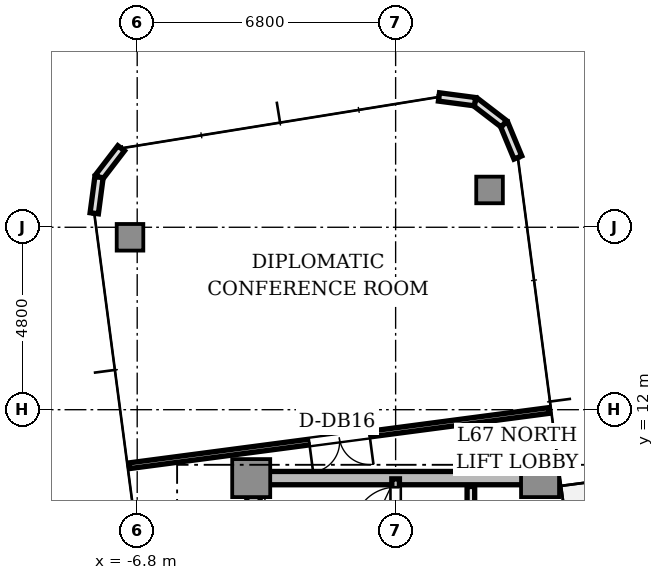
"""IFC4 building model, lengths in metres.
Left out: names, types, materials, properties, quantities, classifications, styles, units other than length and angle.
Written with IfcOpenShell. Run it as: python <this file> out.ifc"""

import sys

from ifc_helpers import new_model, si_unit, direction, frame, frame_2d, origin, origin_2d, place, context, subcontext, project, spatial, rectangle, extrude, source, transform, mapped, element, fill, save


model = new_model("IFC4")
c1 = context("Model", 3, precision=1e-05, world=origin(), true_north=direction((0.0, 1.0)))
c2 = subcontext(c1, "Body", "Model", "MODEL_VIEW")
j1 = project(units=[si_unit("LENGTHUNIT", "METRE"), si_unit("PLANEANGLEUNIT", "RADIAN")], contexts=[c1])
p1 = place(None, origin())
s1 = spatial("IfcSite", under=j1, at=p1, CompositionType="ELEMENT")
p2 = place(p1, origin())
s2 = spatial("IfcBuilding", under=s1, at=p2, CompositionType="ELEMENT")
p3 = place(p2, frame((0.0, 0.0, 241.15)))
s3 = spatial("IfcBuildingStorey", under=s2, at=p3, CompositionType="ELEMENT", Elevation=241.15)
p4 = place(p3, frame((-3.55, 10.2, 0.0), z_axis=(0.0, 0.0, 1.0), x_axis=(1.0, 0.0, 0.0)))
e1 = element("IfcWall", 1, at=p4, inside=s3, PredefinedType="SHEAR", context=c2, shape_type="SweptSolid", body=[
    extrude(rectangle(XDim=7.1, YDim=0.35, at=frame_2d((3.55, 0.0))), origin(), (0.0, 0.0, 1.0), 3.11),
])
p5 = place(p3, frame((-3.74, 2.85, 0.0), z_axis=(0.0, 0.0, 1.0), x_axis=(0.0, 1.0, 0.0)))
e2 = element("IfcWall", 2, at=p5, inside=s3, PredefinedType="SHEAR", context=c2, shape_type="SweptSolid", body=[
    extrude(rectangle(XDim=6.9, YDim=0.35, at=frame_2d((3.45, 0.0))), origin(), (0.0, 0.0, 1.0), 3.11),
])
m1 = source(origin(), c2, "Body", "SweptSolid", [
    extrude(rectangle(XDim=1.0, YDim=1.0, at=origin_2d()), origin(), (0.0, 0.0, 1.0), 3.11),
])
for number, where, z_axis, x_axis in (
    (3, (-3.8, 10.2, 0.0), (0.0, 0.0, 1.0), (1.0, 0.0, 0.0)),
    (4, (3.8, 10.2, 0.0), (0.0, 0.0, 1.0), (1.0, 0.0, 0.0)),
):
    element("IfcColumn", number, at=place(p3, frame(where, z_axis=z_axis, x_axis=x_axis)), inside=s3, PredefinedType="COLUMN", context=c2, shape_type="MappedRepresentation", body=[
        mapped(m1, transform((0.0, 0.0, 0.0), scale=1.0)),
    ])
m2 = source(origin(), c2, "Body", "SweptSolid", [
    extrude(rectangle(XDim=0.7, YDim=0.7, at=origin_2d()), origin(), (0.0, 0.0, 1.0), 3.11),
])
for number, where, z_axis, x_axis in (
    (5, (2.471, 17.782, 0.0), (0.0, 0.0, 1.0), (1.0, 0.0, 0.0)),
    (6, (-6.989, 16.536, 0.0), (0.0, 0.0, 1.0), (1.0, 0.0, 0.0)),
):
    element("IfcColumn", number, at=place(p3, frame(where, z_axis=z_axis, x_axis=x_axis)), inside=s3, PredefinedType="COLUMN", context=c2, shape_type="MappedRepresentation", body=[
        mapped(m2, transform((0.0, 0.0, 0.0), scale=1.0)),
    ])
for number, where, z_axis, x_axis in (
    (7, (3.216, 18.636, 0.0), (0.0, 0.0, 1.0), (-0.383, 0.924, 0.0)),
    (8, (2.85, 19.521, 0.0), (0.0, 0.0, 1.0), (-0.793, 0.609, 0.0)),
    (9, (2.09, 20.104, 0.0), (0.0, 0.0, 1.0), (-0.991, 0.131, 0.0)),
):
    element("IfcWall", number, at=place(p3, frame(where, z_axis=z_axis, x_axis=x_axis)), inside=s3, PredefinedType="STANDARD", context=c2, shape_type="SweptSolid", body=[
        extrude(rectangle(XDim=0.958, YDim=0.22, at=frame_2d((0.479, 0.0))), origin(), (0.0, 0.0, 1.0), 3.11),
    ])
p6 = place(p3, frame((-7.222, 18.878, 0.0), z_axis=(0.0, 0.0, 1.0), x_axis=(-0.608736668033, -0.793372339443, 0.0)))
e10 = element("IfcWall", 10, at=p6, inside=s3, PredefinedType="STANDARD", context=c2, shape_type="SweptSolid", body=[
    extrude(rectangle(XDim=0.957, YDim=0.22, at=frame_2d((0.479, 0.0))), origin(), (0.0, 0.0, 1.0), 3.11),
])
p7 = place(p3, frame((-7.805, 18.118, 0.0), z_axis=(0.0, 0.0, 1.0), x_axis=(-0.130494070426, -0.991449089759, 0.0)))
e11 = element("IfcWall", 11, at=p7, inside=s3, PredefinedType="STANDARD", context=c2, shape_type="SweptSolid", body=[
    extrude(rectangle(XDim=0.958, YDim=0.22, at=frame_2d((0.479, 0.0))), origin(), (0.0, 0.0, 1.0), 3.11),
])
p8 = place(p3, frame((0.0, 2.5, 0.0), z_axis=(0.0, 0.0, 1.0), x_axis=(0.0, 1.0, 0.0)))
e12 = element("IfcWall", 12, at=p8, inside=s3, PredefinedType="SOLIDWALL", context=c2, shape_type="SweptSolid", body=[
    extrude(rectangle(XDim=7.68, YDim=0.2, at=frame_2d((3.84, 0.0))), origin(), (0.0, 0.0, 1.0), 3.11),
])
p9 = place(p8, frame((6.36, 0.0, 0.0)))
e13 = element("IfcOpeningElement", 13, at=p9, cuts=e12, PredefinedType="OPENING", context=c2, shape_type="SweptSolid", body=[
    extrude(rectangle(XDim=1.1, YDim=2.15, at=frame_2d((0.55, 1.075))), frame((0.0, 0.11, 0.0), z_axis=(0.0, -1.0, 0.0), x_axis=(1.0, 0.0, 0.0)), (0.0, 0.0, 1.0), 0.22),
])
p10 = place(p3, frame((1.98, 5.32, 0.0), z_axis=(0.0, 0.0, 1.0), x_axis=(0.0, 1.0, 0.0)))
e14 = element("IfcWall", 14, at=p10, inside=s3, PredefinedType="SOLIDWALL", context=c2, shape_type="SweptSolid", body=[
    extrude(rectangle(XDim=4.66, YDim=0.2, at=frame_2d((2.33, 0.0))), origin(), (0.0, 0.0, 1.0), 2.66),
])
p11 = place(p10, frame((3.04, 0.0, 0.0)))
e15 = element("IfcOpeningElement", 15, at=p11, cuts=e14, PredefinedType="OPENING", context=c2, shape_type="SweptSolid", body=[
    extrude(rectangle(XDim=0.85, YDim=2.1, at=frame_2d((0.425, 1.05))), frame((0.0, 0.11, 0.0), z_axis=(0.0, -1.0, 0.0), x_axis=(1.0, 0.0, 0.0)), (0.0, 0.0, 1.0), 0.22),
])
p12 = place(p3, frame((4.042, 11.98, 0.0), z_axis=(0.0, 0.0, 1.0), x_axis=(-0.991444895998, -0.130525929223, 0.0)))
e16 = element("IfcWall", 16, at=p12, inside=s3, PredefinedType="PARTITIONING", context=c2, shape_type="SweptSolid", body=[
    extrude(rectangle(XDim=11.142, YDim=0.15, at=frame_2d((5.571, 0.0))), origin(), (0.0, 0.0, 1.0), 2.66),
])
p13 = place(p12, frame((4.771, 0.0, 0.0)))
e17 = element("IfcOpeningElement", 17, at=p13, cuts=e16, PredefinedType="OPENING", context=c2, shape_type="SweptSolid", body=[
    extrude(rectangle(XDim=1.6, YDim=2.25, at=frame_2d((0.8, 1.125))), frame((0.0, 0.085, 0.0), z_axis=(0.0, -1.0, 0.0), x_axis=(1.0, 0.0, 0.0)), (0.0, 0.0, 1.0), 0.17),
])
m3 = source(origin(), c2, "Body", "SweptSolid", [
    extrude(rectangle(XDim=1.1, YDim=0.05, at=origin_2d()), origin(), (0.0, 0.0, 1.0), 2.15),
])
p14 = place(p9, frame((0.55, 0.0, 0.0)))
e18 = element("IfcDoor", 18, at=p14, inside=s3, OperationType="SINGLE_SWING_LEFT", PredefinedType="DOOR", context=c2, shape_type="MappedRepresentation", body=[
    mapped(m3, transform((0.0, 0.0, 0.0), scale=1.0)),
])
fill(e13, e18)
m4 = source(origin(), c2, "Body", "SweptSolid", [
    extrude(rectangle(XDim=1.6, YDim=0.05, at=origin_2d()), origin(), (0.0, 0.0, 1.0), 2.25),
])
p15 = place(p13, frame((0.8, 0.0, 0.0)))
e19 = element("IfcDoor", 19, at=p15, inside=s3, OperationType="DOUBLE_DOOR_SINGLE_SWING", PredefinedType="DOOR", context=c2, shape_type="MappedRepresentation", body=[
    mapped(m4, transform((0.0, 0.0, 0.0), scale=1.0)),
])
fill(e17, e19)
save(model, sys.argv[1])
